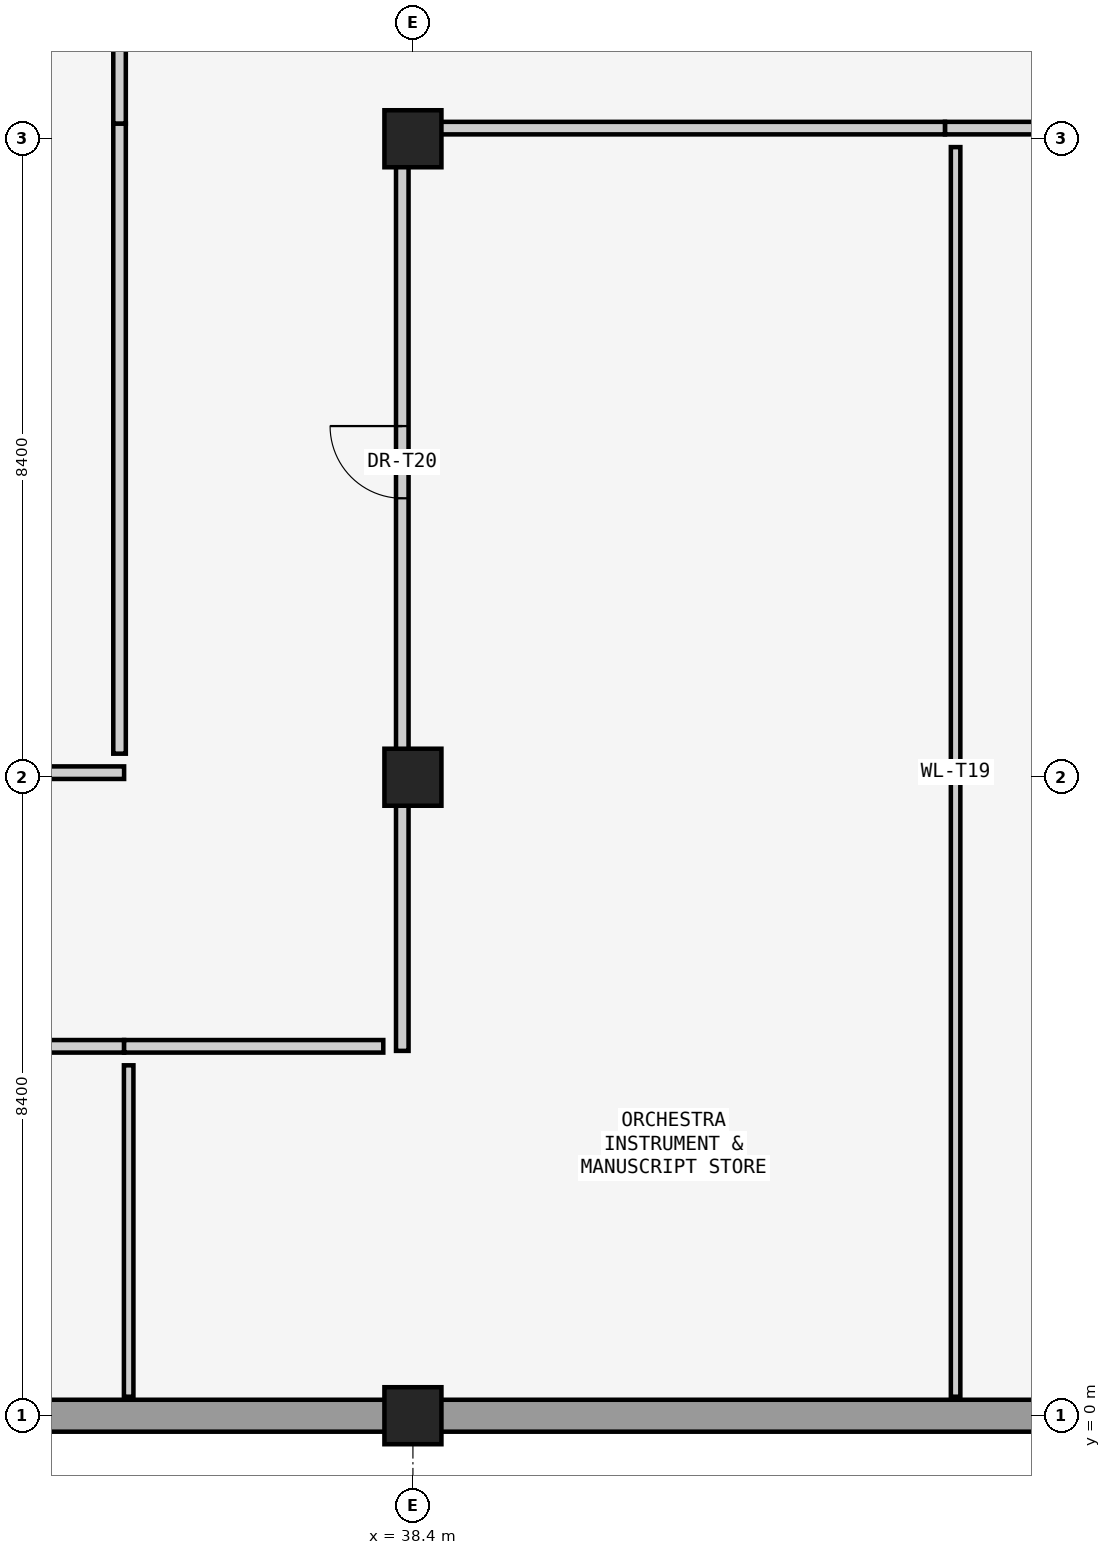
"""IFC4 building model, lengths in metres.
Left out: names, types, materials, properties, quantities, classifications, styles, units other than length and angle.
Written with IfcOpenShell. Run it as: python <this file> out.ifc"""

import sys

from ifc_helpers import new_model, si_unit, direction, frame, frame_2d, origin, origin_2d, place, context, subcontext, project, spatial, rectangle, extrude, element, fill, save


model = new_model("IFC4")
c1 = context("Model", 3, precision=1e-05, world=origin(), true_north=direction((0.0, 1.0)))
c2 = subcontext(c1, "Body", "Model", "MODEL_VIEW")
j1 = project(units=[si_unit("LENGTHUNIT", "METRE"), si_unit("PLANEANGLEUNIT", "RADIAN")], contexts=[c1])
p1 = place(None, origin())
s1 = spatial("IfcSite", under=j1, at=p1, CompositionType="ELEMENT")
p2 = place(p1, origin())
s2 = spatial("IfcBuilding", under=s1, at=p2, CompositionType="ELEMENT")
p3 = place(p2, frame((0.0, 0.0, -4.8)))
s3 = spatial("IfcBuildingStorey", under=s2, at=p3, CompositionType="ELEMENT", Elevation=-4.8)
for number, where, z_axis, x_axis in (
    (1, (38.4, 0.0, 0.0), (0.0, 0.0, 1.0), (1.0, 0.0, 0.0)),
    (2, (38.4, 8.4, 0.0), (0.0, 0.0, 1.0), (1.0, 0.0, 0.0)),
    (3, (38.4, 16.8, 0.0), (0.0, 0.0, 1.0), (1.0, 0.0, 0.0)),
):
    element("IfcColumn", number, at=place(p3, frame(where, z_axis=z_axis, x_axis=x_axis)), inside=s3, PredefinedType="COLUMN", context=c2, shape_type="SweptSolid", body=[
        extrude(rectangle(XDim=0.75, YDim=0.75, at=origin_2d()), origin(), (0.0, 0.0, 1.0), 4.38),
    ])
p4 = place(p3, frame((38.4, 0.0, 0.0), z_axis=(0.0, 0.0, 1.0), x_axis=(-1.0, 0.0, 0.0)))
e4 = element("IfcWall", 4, at=p4, inside=s3, PredefinedType="USERDEFINED", context=c2, shape_type="SweptSolid", body=[
    extrude(rectangle(XDim=9.6, YDim=0.42, at=frame_2d((4.8, 0.0))), origin(), (0.0, 0.0, 1.0), 4.36),
])
p5 = place(p3, frame((48.0, 0.0, 0.0), z_axis=(0.0, 0.0, 1.0), x_axis=(-1.0, 0.0, 0.0)))
e5 = element("IfcWall", 5, at=p5, inside=s3, PredefinedType="USERDEFINED", context=c2, shape_type="SweptSolid", body=[
    extrude(rectangle(XDim=9.6, YDim=0.42, at=frame_2d((4.8, 0.0))), origin(), (0.0, 0.0, 1.0), 4.55),
])
p6 = place(p3, frame((45.4, 16.94, 0.0), z_axis=(0.0, 0.0, 1.0), x_axis=(1.0, 0.0, 0.0)))
e6 = element("IfcWall", 6, at=p6, inside=s3, PredefinedType="PARTITIONING", context=c2, shape_type="SweptSolid", body=[
    extrude(rectangle(XDim=12.4, YDim=0.165, at=frame_2d((6.2, 0.0))), origin(), (0.0, 0.0, 1.0), 3.26),
])
p7 = place(p3, frame((19.4, 4.86, 0.0), z_axis=(0.0, 0.0, 1.0), x_axis=(1.0, 0.0, 0.0)))
e7 = element("IfcWall", 7, at=p7, inside=s3, PredefinedType="PARTITIONING", context=c2, shape_type="SweptSolid", body=[
    extrude(rectangle(XDim=15.2, YDim=0.165, at=frame_2d((7.6, 0.0))), origin(), (0.0, 0.0, 1.0), 4.33),
])
p8 = place(p7, frame((7.125, 0.0, 0.0)))
e8 = element("IfcOpeningElement", 8, at=p8, cuts=e7, PredefinedType="OPENING", context=c2, shape_type="SweptSolid", body=[
    extrude(rectangle(XDim=0.95, YDim=2.15, at=frame_2d((0.475, 1.075))), frame((0.0, 0.093, 0.0), z_axis=(0.0, -1.0, 0.0), x_axis=(1.0, 0.0, 0.0)), (0.0, 0.0, 1.0), 0.185),
])
p9 = place(p3, frame((28.55, 8.46, 0.0), z_axis=(0.0, 0.0, 1.0), x_axis=(1.0, 0.0, 0.0)))
e9 = element("IfcWall", 9, at=p9, inside=s3, PredefinedType="PARTITIONING", context=c2, shape_type="SweptSolid", body=[
    extrude(rectangle(XDim=6.05, YDim=0.165, at=frame_2d((3.025, 0.0))), origin(), (0.0, 0.0, 1.0), 3.36),
])
p10 = place(p3, frame((34.54, 8.71, 0.0), z_axis=(0.0, 0.0, 1.0), x_axis=(0.0, 1.0, 0.0)))
e10 = element("IfcWall", 10, at=p10, inside=s3, PredefinedType="PARTITIONING", context=c2, shape_type="SweptSolid", body=[
    extrude(rectangle(XDim=8.29, YDim=0.165, at=frame_2d((4.145, 0.0))), origin(), (0.0, 0.0, 1.0), 4.33),
])
p11 = place(p3, frame((34.54, 17.0, 0.0), z_axis=(0.0, 0.0, 1.0), x_axis=(0.0, 1.0, 0.0)))
e11 = element("IfcWall", 11, at=p11, inside=s3, PredefinedType="PARTITIONING", context=c2, shape_type="SweptSolid", body=[
    extrude(rectangle(XDim=3.6, YDim=0.165, at=frame_2d((1.8, 0.0))), origin(), (0.0, 0.0, 1.0), 4.33),
])
p12 = place(p3, frame((38.2, 16.94, 0.0), z_axis=(0.0, 0.0, 1.0), x_axis=(1.0, 0.0, 0.0)))
e12 = element("IfcWall", 12, at=p12, inside=s3, PredefinedType="PARTITIONING", context=c2, shape_type="SweptSolid", body=[
    extrude(rectangle(XDim=7.2, YDim=0.165, at=frame_2d((3.6, 0.0))), origin(), (0.0, 0.0, 1.0), 3.26),
])
p13 = place(p3, frame((38.26, 8.4, 0.0), z_axis=(0.0, 0.0, 1.0), x_axis=(0.0, 1.0, 0.0)))
e13 = element("IfcWall", 13, at=p13, inside=s3, PredefinedType="PARTITIONING", context=c2, shape_type="SweptSolid", body=[
    extrude(rectangle(XDim=8.29, YDim=0.165, at=frame_2d((4.145, 0.0))), origin(), (0.0, 0.0, 1.0), 3.61),
])
p14 = place(p13, frame((3.67, 0.0, 0.0)))
e14 = element("IfcOpeningElement", 14, at=p14, cuts=e13, PredefinedType="OPENING", context=c2, shape_type="SweptSolid", body=[
    extrude(rectangle(XDim=0.95, YDim=2.15, at=frame_2d((0.475, 1.075))), frame((0.0, 0.093, 0.0), z_axis=(0.0, -1.0, 0.0), x_axis=(1.0, 0.0, 0.0)), (0.0, 0.0, 1.0), 0.185),
])
p15 = place(p3, frame((38.26, 4.8, 0.0), z_axis=(0.0, 0.0, 1.0), x_axis=(0.0, 1.0, 0.0)))
e15 = element("IfcWall", 15, at=p15, inside=s3, PredefinedType="PARTITIONING", context=c2, shape_type="SweptSolid", body=[
    extrude(rectangle(XDim=3.6, YDim=0.165, at=frame_2d((1.8, 0.0))), origin(), (0.0, 0.0, 1.0), 3.56),
])
p16 = place(p3, frame((34.6, 4.86, 0.0), z_axis=(0.0, 0.0, 1.0), x_axis=(1.0, 0.0, 0.0)))
e16 = element("IfcWall", 16, at=p16, inside=s3, PredefinedType="PARTITIONING", context=c2, shape_type="SweptSolid", body=[
    extrude(rectangle(XDim=3.41, YDim=0.165, at=frame_2d((1.705, 0.0))), origin(), (0.0, 0.0, 1.0), 4.33),
])
p17 = place(p3, frame((45.54, 0.25, 0.0), z_axis=(0.0, 0.0, 1.0), x_axis=(0.0, 1.0, 0.0)))
e17 = element("IfcWall", 17, at=p17, inside=s3, PredefinedType="PARTITIONING", context=c2, shape_type="SweptSolid", body=[
    extrude(rectangle(XDim=16.44, YDim=0.125, at=frame_2d((8.22, 0.0))), origin(), (0.0, 0.0, 1.0), 4.33),
])
p18 = place(p3, frame((34.66, 0.25, 0.0), z_axis=(0.0, 0.0, 1.0), x_axis=(0.0, 1.0, 0.0)))
e18 = element("IfcWall", 18, at=p18, inside=s3, PredefinedType="PARTITIONING", context=c2, shape_type="SweptSolid", body=[
    extrude(rectangle(XDim=4.36, YDim=0.125, at=frame_2d((2.18, 0.0))), origin(), (0.0, 0.0, 1.0), 4.33),
])
p19 = place(p14, origin())
e19 = element("IfcDoor", 19, at=p19, inside=s3, OperationType="SINGLE_SWING_RIGHT", PredefinedType="DOOR", context=c2, shape_type="SweptSolid", body=[
    extrude(rectangle(XDim=0.95, YDim=2.15, at=frame_2d((0.475, 1.075))), frame((0.0, 0.025, 0.0), z_axis=(0.0, -1.0, 0.0), x_axis=(1.0, 0.0, 0.0)), (0.0, 0.0, 1.0), 0.05),
])
fill(e14, e19)
save(model, sys.argv[1])
